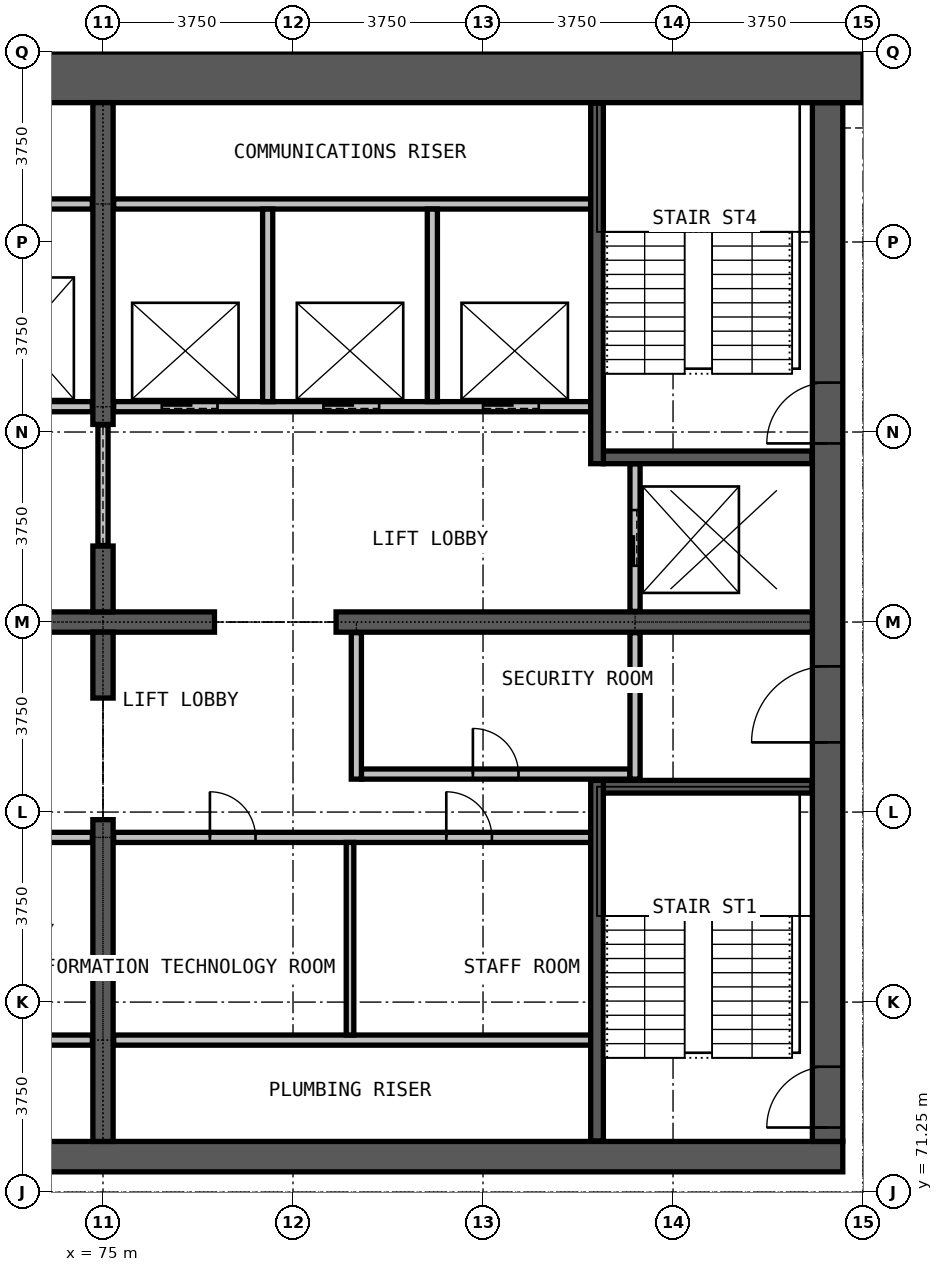
"""IFC4 building model, lengths in metres.
Left out: names, types, materials, properties, quantities, classifications, styles, units other than length and angle.
Written with IfcOpenShell. Run it as: python <this file> out.ifc"""

import sys

from ifc_helpers import new_model, si_unit, direction, frame, frame_2d, origin, place, context, subcontext, project, spatial, rectangle, extrude, element, fill, save


model = new_model("IFC4")
c1 = context("Model", 3, precision=1e-05, world=origin(), true_north=direction((0.0, 1.0)))
c2 = subcontext(c1, "Body", "Model", "MODEL_VIEW")
j1 = project(units=[si_unit("LENGTHUNIT", "METRE"), si_unit("PLANEANGLEUNIT", "RADIAN")], contexts=[c1])
p1 = place(None, origin())
s1 = spatial("IfcSite", under=j1, at=p1, CompositionType="ELEMENT")
p2 = place(p1, origin())
s2 = spatial("IfcBuilding", under=s1, at=p2, CompositionType="ELEMENT")
p3 = place(p2, frame((0.0, 0.0, 199.5)))
s3 = spatial("IfcBuildingStorey", under=s2, at=p3, CompositionType="ELEMENT", Elevation=199.5)
p4 = place(p3, frame((60.4, 71.95, 0.0), z_axis=(0.0, 0.0, 1.0), x_axis=(1.0, 0.0, 0.0)))
e1 = element("IfcWall", 1, at=p4, inside=s3, PredefinedType="SHEAR", context=c2, shape_type="SweptSolid", body=[
    extrude(rectangle(XDim=29.2, YDim=0.6, at=frame_2d((14.6, 0.0))), origin(), (0.0, 0.0, 1.0), 3.6),
])
p5 = place(p3, frame((89.3, 72.25, 0.0), z_axis=(0.0, 0.0, 1.0), x_axis=(0.0, 1.0, 0.0)))
e2 = element("IfcWall", 2, at=p5, inside=s3, PredefinedType="SHEAR", context=c2, shape_type="SweptSolid", body=[
    extrude(rectangle(XDim=20.5, YDim=0.6, at=frame_2d((10.25, 0.0))), origin(), (0.0, 0.0, 1.0), 3.6),
])
p6 = place(p5, frame((0.275, 0.0, 0.0)))
e3 = element("IfcOpeningElement", 3, at=p6, cuts=e2, PredefinedType="OPENING", context=c2, shape_type="SweptSolid", body=[
    extrude(rectangle(XDim=1.2, YDim=2.2, at=frame_2d((0.6, 1.1))), frame((0.0, 0.31, 0.0), z_axis=(0.0, -1.0, 0.0), x_axis=(1.0, 0.0, 0.0)), (0.0, 0.0, 1.0), 0.62),
])
p7 = place(p5, frame((13.775, 0.0, 0.0)))
e4 = element("IfcOpeningElement", 4, at=p7, cuts=e2, PredefinedType="OPENING", context=c2, shape_type="SweptSolid", body=[
    extrude(rectangle(XDim=1.2, YDim=2.2, at=frame_2d((0.6, 1.1))), frame((0.0, 0.31, 0.0), z_axis=(0.0, -1.0, 0.0), x_axis=(1.0, 0.0, 0.0)), (0.0, 0.0, 1.0), 0.62),
])
p8 = place(p5, frame((7.875, 0.0, 0.0)))
e5 = element("IfcOpeningElement", 5, at=p8, cuts=e2, PredefinedType="OPENING", context=c2, shape_type="SweptSolid", body=[
    extrude(rectangle(XDim=1.5, YDim=2.2, at=frame_2d((0.75, 1.1))), frame((0.0, 0.31, 0.0), z_axis=(0.0, -1.0, 0.0), x_axis=(1.0, 0.0, 0.0)), (0.0, 0.0, 1.0), 0.62),
])
p9 = place(p3, frame((90.0, 93.25, 0.0), z_axis=(0.0, 0.0, 1.0), x_axis=(-1.0, 0.0, 0.0)))
e6 = element("IfcWall", 6, at=p9, inside=s3, PredefinedType="SHEAR", context=c2, shape_type="SweptSolid", body=[
    extrude(rectangle(XDim=30.0, YDim=1.0, at=frame_2d((15.0, 0.0))), origin(), (0.0, 0.0, 1.0), 3.6),
])
p10 = place(p3, frame((72.8, 82.5, 0.0), z_axis=(0.0, 0.0, 1.0), x_axis=(1.0, 0.0, 0.0)))
e7 = element("IfcWall", 7, at=p10, inside=s3, PredefinedType="SHEAR", context=c2, shape_type="SweptSolid", body=[
    extrude(rectangle(XDim=4.4, YDim=0.4, at=frame_2d((2.2, 0.0))), origin(), (0.0, 0.0, 1.0), 3.6),
])
p11 = place(p3, frame((79.6, 82.5, 0.0), z_axis=(0.0, 0.0, 1.0), x_axis=(1.0, 0.0, 0.0)))
e8 = element("IfcWall", 8, at=p11, inside=s3, PredefinedType="SHEAR", context=c2, shape_type="SweptSolid", body=[
    extrude(rectangle(XDim=9.4, YDim=0.4, at=frame_2d((4.7, 0.0))), origin(), (0.0, 0.0, 1.0), 3.6),
])
p12 = place(p3, frame((75.0, 72.25, 0.0), z_axis=(0.0, 0.0, 1.0), x_axis=(0.0, 1.0, 0.0)))
e9 = element("IfcWall", 9, at=p12, inside=s3, PredefinedType="SHEAR", context=c2, shape_type="SweptSolid", body=[
    extrude(rectangle(XDim=6.35, YDim=0.4, at=frame_2d((3.175, 0.0))), origin(), (0.0, 0.0, 1.0), 3.6),
])
for number, where, z_axis, x_axis in (
    (10, (75.0, 81.0, 0.0), (0.0, 0.0, 1.0), (0.0, 1.0, 0.0)),
    (11, (75.0, 82.7, 0.0), (0.0, 0.0, 1.0), (0.0, 1.0, 0.0)),
):
    element("IfcWall", number, at=place(p3, frame(where, z_axis=z_axis, x_axis=x_axis)), inside=s3, PredefinedType="SHEAR", context=c2, shape_type="SweptSolid", body=[
        extrude(rectangle(XDim=1.3, YDim=0.4, at=frame_2d((0.65, 0.0))), origin(), (0.0, 0.0, 1.0), 3.6),
    ])
p13 = place(p3, frame((75.0, 86.4, 0.0), z_axis=(0.0, 0.0, 1.0), x_axis=(0.0, 1.0, 0.0)))
e12 = element("IfcWall", 12, at=p13, inside=s3, PredefinedType="SHEAR", context=c2, shape_type="SweptSolid", body=[
    extrude(rectangle(XDim=6.35, YDim=0.4, at=frame_2d((3.175, 0.0))), origin(), (0.0, 0.0, 1.0), 3.6),
])
for number, where, z_axis, x_axis in (
    (13, (65.375, 74.25, 0.0), (0.0, 0.0, 1.0), (1.0, 0.0, 0.0)),
    (14, (75.21, 74.25, 0.0), (0.0, 0.0, 1.0), (1.0, 0.0, 0.0)),
):
    element("IfcWall", number, at=place(p3, frame(where, z_axis=z_axis, x_axis=x_axis)), inside=s3, PredefinedType="PARTITIONING", context=c2, shape_type="SweptSolid", body=[
        extrude(rectangle(XDim=9.415, YDim=0.2, at=frame_2d((4.708, 0.0))), origin(), (0.0, 0.0, 1.0), 3.3),
    ])
p14 = place(p3, frame((65.375, 78.25, 0.0), z_axis=(0.0, 0.0, 1.0), x_axis=(1.0, 0.0, 0.0)))
e15 = element("IfcWall", 15, at=p14, inside=s3, PredefinedType="PARTITIONING", context=c2, shape_type="SweptSolid", body=[
    extrude(rectangle(XDim=9.415, YDim=0.2, at=frame_2d((4.708, 0.0))), origin(), (0.0, 0.0, 1.0), 3.3),
])
p15 = place(p14, frame((1.0, 0.0, 0.0)))
e16 = element("IfcOpeningElement", 16, at=p15, cuts=e15, PredefinedType="OPENING", context=c2, shape_type="SweptSolid", body=[
    extrude(rectangle(XDim=0.9, YDim=2.2, at=frame_2d((0.45, 1.1))), frame((0.0, 0.11, 0.0), z_axis=(0.0, -1.0, 0.0), x_axis=(1.0, 0.0, 0.0)), (0.0, 0.0, 1.0), 0.22),
])
p16 = place(p14, frame((5.665, 0.0, 0.0)))
e17 = element("IfcOpeningElement", 17, at=p16, cuts=e15, PredefinedType="OPENING", context=c2, shape_type="SweptSolid", body=[
    extrude(rectangle(XDim=0.9, YDim=2.2, at=frame_2d((0.45, 1.1))), frame((0.0, 0.11, 0.0), z_axis=(0.0, -1.0, 0.0), x_axis=(1.0, 0.0, 0.0)), (0.0, 0.0, 1.0), 0.22),
])
p17 = place(p3, frame((75.21, 78.25, 0.0), z_axis=(0.0, 0.0, 1.0), x_axis=(1.0, 0.0, 0.0)))
e18 = element("IfcWall", 18, at=p17, inside=s3, PredefinedType="PARTITIONING", context=c2, shape_type="SweptSolid", body=[
    extrude(rectangle(XDim=9.415, YDim=0.2, at=frame_2d((4.708, 0.0))), origin(), (0.0, 0.0, 1.0), 3.3),
])
p18 = place(p17, frame((1.9, 0.0, 0.0)))
e19 = element("IfcOpeningElement", 19, at=p18, cuts=e18, PredefinedType="OPENING", context=c2, shape_type="SweptSolid", body=[
    extrude(rectangle(XDim=0.9, YDim=2.2, at=frame_2d((0.45, 1.1))), frame((0.0, 0.11, 0.0), z_axis=(0.0, -1.0, 0.0), x_axis=(1.0, 0.0, 0.0)), (0.0, 0.0, 1.0), 0.22),
])
p19 = place(p17, frame((6.565, 0.0, 0.0)))
e20 = element("IfcOpeningElement", 20, at=p19, cuts=e18, PredefinedType="OPENING", context=c2, shape_type="SweptSolid", body=[
    extrude(rectangle(XDim=0.9, YDim=2.2, at=frame_2d((0.45, 1.1))), frame((0.0, 0.11, 0.0), z_axis=(0.0, -1.0, 0.0), x_axis=(1.0, 0.0, 0.0)), (0.0, 0.0, 1.0), 0.22),
])
p20 = place(p3, frame((80.1, 79.5, 0.0), z_axis=(0.0, 0.0, 1.0), x_axis=(1.0, 0.0, 0.0)))
e21 = element("IfcWall", 21, at=p20, inside=s3, PredefinedType="PARTITIONING", context=c2, shape_type="SweptSolid", body=[
    extrude(rectangle(XDim=5.3, YDim=0.2, at=frame_2d((2.65, 0.0))), origin(), (0.0, 0.0, 1.0), 3.3),
])
p21 = place(p20, frame((2.2, 0.0, 0.0)))
e22 = element("IfcOpeningElement", 22, at=p21, cuts=e21, PredefinedType="OPENING", context=c2, shape_type="SweptSolid", body=[
    extrude(rectangle(XDim=0.9, YDim=2.2, at=frame_2d((0.45, 1.1))), frame((0.0, 0.11, 0.0), z_axis=(0.0, -1.0, 0.0), x_axis=(1.0, 0.0, 0.0)), (0.0, 0.0, 1.0), 0.22),
])
p22 = place(p3, frame((75.0, 84.01, 0.0), z_axis=(0.0, 0.0, 1.0), x_axis=(0.0, 1.0, 0.0)))
e23 = element("IfcWall", 23, at=p22, inside=s3, PredefinedType="PARTITIONING", context=c2, shape_type="SweptSolid", body=[
    extrude(rectangle(XDim=2.38, YDim=0.2, at=frame_2d((1.19, 0.0))), origin(), (0.0, 0.0, 1.0), 2.4),
])
for number, where, z_axis, x_axis in (
    (24, (80.0, 79.4, 0.0), (0.0, 0.0, 1.0), (0.0, 1.0, 0.0)),
    (25, (85.5, 79.4, 0.0), (0.0, 0.0, 1.0), (0.0, 1.0, 0.0)),
):
    element("IfcWall", number, at=place(p3, frame(where, z_axis=z_axis, x_axis=x_axis)), inside=s3, PredefinedType="PARTITIONING", context=c2, shape_type="SweptSolid", body=[
        extrude(rectangle(XDim=2.89, YDim=0.2, at=frame_2d((1.445, 0.0))), origin(), (0.0, 0.0, 1.0), 3.3),
    ])
p23 = place(p3, frame((79.875, 74.35, 0.0), z_axis=(0.0, 0.0, 1.0), x_axis=(0.0, 1.0, 0.0)))
e26 = element("IfcWall", 26, at=p23, inside=s3, PredefinedType="PARTITIONING", context=c2, shape_type="SweptSolid", body=[
    extrude(rectangle(XDim=3.8, YDim=0.15, at=frame_2d((1.9, 0.0))), origin(), (0.0, 0.0, 1.0), 3.3),
])
p24 = place(p3, frame((65.375, 86.75, 0.0), z_axis=(0.0, 0.0, 1.0), x_axis=(1.0, 0.0, 0.0)))
e27 = element("IfcWall", 27, at=p24, inside=s3, PredefinedType="PARTITIONING", context=c2, shape_type="SweptSolid", body=[
    extrude(rectangle(XDim=9.415, YDim=0.2, at=frame_2d((4.708, 0.0))), origin(), (0.0, 0.0, 1.0), 3.3),
])
p25 = place(p24, frame((1.0, 0.0, 0.0)))
e28 = element("IfcOpeningElement", 28, at=p25, cuts=e27, PredefinedType="OPENING", context=c2, shape_type="SweptSolid", body=[
    extrude(rectangle(XDim=1.1, YDim=2.2, at=frame_2d((0.55, 1.1))), frame((0.0, 0.11, 0.0), z_axis=(0.0, -1.0, 0.0), x_axis=(1.0, 0.0, 0.0)), (0.0, 0.0, 1.0), 0.22),
])
p26 = place(p24, frame((4.175, 0.0, 0.0)))
e29 = element("IfcOpeningElement", 29, at=p26, cuts=e27, PredefinedType="OPENING", context=c2, shape_type="SweptSolid", body=[
    extrude(rectangle(XDim=1.1, YDim=2.2, at=frame_2d((0.55, 1.1))), frame((0.0, 0.11, 0.0), z_axis=(0.0, -1.0, 0.0), x_axis=(1.0, 0.0, 0.0)), (0.0, 0.0, 1.0), 0.22),
])
p27 = place(p24, frame((7.325, 0.0, 0.0)))
e30 = element("IfcOpeningElement", 30, at=p27, cuts=e27, PredefinedType="OPENING", context=c2, shape_type="SweptSolid", body=[
    extrude(rectangle(XDim=1.1, YDim=2.2, at=frame_2d((0.55, 1.1))), frame((0.0, 0.11, 0.0), z_axis=(0.0, -1.0, 0.0), x_axis=(1.0, 0.0, 0.0)), (0.0, 0.0, 1.0), 0.22),
])
p28 = place(p3, frame((75.21, 86.75, 0.0), z_axis=(0.0, 0.0, 1.0), x_axis=(1.0, 0.0, 0.0)))
e31 = element("IfcWall", 31, at=p28, inside=s3, PredefinedType="PARTITIONING", context=c2, shape_type="SweptSolid", body=[
    extrude(rectangle(XDim=9.415, YDim=0.2, at=frame_2d((4.708, 0.0))), origin(), (0.0, 0.0, 1.0), 3.3),
])
p29 = place(p28, frame((0.95, 0.0, 0.0)))
e32 = element("IfcOpeningElement", 32, at=p29, cuts=e31, PredefinedType="OPENING", context=c2, shape_type="SweptSolid", body=[
    extrude(rectangle(XDim=1.1, YDim=2.2, at=frame_2d((0.55, 1.1))), frame((0.0, 0.11, 0.0), z_axis=(0.0, -1.0, 0.0), x_axis=(1.0, 0.0, 0.0)), (0.0, 0.0, 1.0), 0.22),
])
p30 = place(p28, frame((4.14, 0.0, 0.0)))
e33 = element("IfcOpeningElement", 33, at=p30, cuts=e31, PredefinedType="OPENING", context=c2, shape_type="SweptSolid", body=[
    extrude(rectangle(XDim=1.1, YDim=2.2, at=frame_2d((0.55, 1.1))), frame((0.0, 0.11, 0.0), z_axis=(0.0, -1.0, 0.0), x_axis=(1.0, 0.0, 0.0)), (0.0, 0.0, 1.0), 0.22),
])
p31 = place(p28, frame((7.29, 0.0, 0.0)))
e34 = element("IfcOpeningElement", 34, at=p31, cuts=e31, PredefinedType="OPENING", context=c2, shape_type="SweptSolid", body=[
    extrude(rectangle(XDim=1.1, YDim=2.2, at=frame_2d((0.55, 1.1))), frame((0.0, 0.11, 0.0), z_axis=(0.0, -1.0, 0.0), x_axis=(1.0, 0.0, 0.0)), (0.0, 0.0, 1.0), 0.22),
])
for number, where, z_axis, x_axis in (
    (35, (65.375, 90.75, 0.0), (0.0, 0.0, 1.0), (1.0, 0.0, 0.0)),
    (36, (75.21, 90.75, 0.0), (0.0, 0.0, 1.0), (1.0, 0.0, 0.0)),
):
    element("IfcWall", number, at=place(p3, frame(where, z_axis=z_axis, x_axis=x_axis)), inside=s3, PredefinedType="PARTITIONING", context=c2, shape_type="SweptSolid", body=[
        extrude(rectangle(XDim=9.415, YDim=0.2, at=frame_2d((4.708, 0.0))), origin(), (0.0, 0.0, 1.0), 3.3),
    ])
for number, where, z_axis, x_axis in (
    (37, (78.25, 86.85, 0.0), (0.0, 0.0, 1.0), (0.0, 1.0, 0.0)),
    (38, (81.5, 86.85, 0.0), (0.0, 0.0, 1.0), (0.0, 1.0, 0.0)),
):
    element("IfcWall", number, at=place(p3, frame(where, z_axis=z_axis, x_axis=x_axis)), inside=s3, PredefinedType="PARTITIONING", context=c2, shape_type="SweptSolid", body=[
        extrude(rectangle(XDim=3.8, YDim=0.2, at=frame_2d((1.9, 0.0))), origin(), (0.0, 0.0, 1.0), 3.3),
    ])
p32 = place(p3, frame((85.5, 82.71, 0.0), z_axis=(0.0, 0.0, 1.0), x_axis=(0.0, 1.0, 0.0)))
e39 = element("IfcWall", 39, at=p32, inside=s3, PredefinedType="PARTITIONING", context=c2, shape_type="SweptSolid", body=[
    extrude(rectangle(XDim=2.915, YDim=0.2, at=frame_2d((1.458, 0.0))), origin(), (0.0, 0.0, 1.0), 3.3),
])
p33 = place(p32, frame((0.9, 0.0, 0.0)))
e40 = element("IfcOpeningElement", 40, at=p33, cuts=e39, PredefinedType="OPENING", context=c2, shape_type="SweptSolid", body=[
    extrude(rectangle(XDim=1.1, YDim=2.2, at=frame_2d((0.55, 1.1))), frame((0.0, 0.11, 0.0), z_axis=(0.0, -1.0, 0.0), x_axis=(1.0, 0.0, 0.0)), (0.0, 0.0, 1.0), 0.22),
])
for number, where, z_axis, x_axis in (
    (41, (84.875, 79.25, 0.0), (0.0, 0.0, 1.0), (1.0, 0.0, 0.0)),
    (42, (84.875, 85.75, 0.0), (0.0, 0.0, 1.0), (1.0, 0.0, 0.0)),
):
    element("IfcWall", number, at=place(p3, frame(where, z_axis=z_axis, x_axis=x_axis)), inside=s3, PredefinedType="PARTITIONING", context=c2, shape_type="SweptSolid", body=[
        extrude(rectangle(XDim=4.115, YDim=0.25, at=frame_2d((2.058, 0.0))), origin(), (0.0, 0.0, 1.0), 3.3),
    ])
for number, where, z_axis, x_axis in (
    (43, (84.75, 72.26, 0.0), (0.0, 0.0, 1.0), (0.0, 1.0, 0.0)),
    (44, (84.75, 85.625, 0.0), (0.0, 0.0, 1.0), (0.0, 1.0, 0.0)),
):
    element("IfcWall", number, at=place(p3, frame(where, z_axis=z_axis, x_axis=x_axis)), inside=s3, PredefinedType="PARTITIONING", context=c2, shape_type="SweptSolid", body=[
        extrude(rectangle(XDim=7.115, YDim=0.25, at=frame_2d((3.558, 0.0))), origin(), (0.0, 0.0, 1.0), 3.3),
    ])
p34 = place(p29, origin())
e45 = element("IfcDoor", 45, at=p34, inside=s3, OperationType="DOUBLE_DOOR_SLIDING", PredefinedType="DOOR", context=c2, shape_type="SweptSolid", body=[
    extrude(rectangle(XDim=1.1, YDim=2.2, at=frame_2d((0.55, 1.1))), frame((0.0, 0.025, 0.0), z_axis=(0.0, -1.0, 0.0), x_axis=(1.0, 0.0, 0.0)), (0.0, 0.0, 1.0), 0.05),
])
fill(e32, e45)
p35 = place(p30, origin())
e46 = element("IfcDoor", 46, at=p35, inside=s3, OperationType="DOUBLE_DOOR_SLIDING", PredefinedType="DOOR", context=c2, shape_type="SweptSolid", body=[
    extrude(rectangle(XDim=1.1, YDim=2.2, at=frame_2d((0.55, 1.1))), frame((0.0, 0.025, 0.0), z_axis=(0.0, -1.0, 0.0), x_axis=(1.0, 0.0, 0.0)), (0.0, 0.0, 1.0), 0.05),
])
fill(e33, e46)
p36 = place(p31, origin())
e47 = element("IfcDoor", 47, at=p36, inside=s3, OperationType="DOUBLE_DOOR_SLIDING", PredefinedType="DOOR", context=c2, shape_type="SweptSolid", body=[
    extrude(rectangle(XDim=1.1, YDim=2.2, at=frame_2d((0.55, 1.1))), frame((0.0, 0.025, 0.0), z_axis=(0.0, -1.0, 0.0), x_axis=(1.0, 0.0, 0.0)), (0.0, 0.0, 1.0), 0.05),
])
fill(e34, e47)
p37 = place(p33, origin())
e48 = element("IfcDoor", 48, at=p37, inside=s3, OperationType="DOUBLE_DOOR_SLIDING", PredefinedType="DOOR", context=c2, shape_type="SweptSolid", body=[
    extrude(rectangle(XDim=1.1, YDim=2.2, at=frame_2d((0.55, 1.1))), frame((0.0, 0.025, 0.0), z_axis=(0.0, -1.0, 0.0), x_axis=(1.0, 0.0, 0.0)), (0.0, 0.0, 1.0), 0.05),
])
fill(e40, e48)
p38 = place(p6, origin())
e49 = element("IfcDoor", 49, at=p38, inside=s3, OperationType="SINGLE_SWING_RIGHT", PredefinedType="DOOR", context=c2, shape_type="SweptSolid", body=[
    extrude(rectangle(XDim=1.2, YDim=2.2, at=frame_2d((0.6, 1.1))), frame((0.0, 0.025, 0.0), z_axis=(0.0, -1.0, 0.0), x_axis=(1.0, 0.0, 0.0)), (0.0, 0.0, 1.0), 0.05),
])
fill(e3, e49)
p39 = place(p7, origin())
e50 = element("IfcDoor", 50, at=p39, inside=s3, OperationType="SINGLE_SWING_LEFT", PredefinedType="DOOR", context=c2, shape_type="SweptSolid", body=[
    extrude(rectangle(XDim=1.2, YDim=2.2, at=frame_2d((0.6, 1.1))), frame((0.0, 0.025, 0.0), z_axis=(0.0, -1.0, 0.0), x_axis=(1.0, 0.0, 0.0)), (0.0, 0.0, 1.0), 0.05),
])
fill(e4, e50)
p40 = place(p8, origin())
e51 = element("IfcDoor", 51, at=p40, inside=s3, OperationType="DOUBLE_DOOR_SINGLE_SWING", PredefinedType="DOOR", context=c2, shape_type="SweptSolid", body=[
    extrude(rectangle(XDim=1.5, YDim=2.2, at=frame_2d((0.75, 1.1))), frame((0.0, 0.025, 0.0), z_axis=(0.0, -1.0, 0.0), x_axis=(1.0, 0.0, 0.0)), (0.0, 0.0, 1.0), 0.05),
])
fill(e5, e51)
p41 = place(p21, origin())
e52 = element("IfcDoor", 52, at=p41, inside=s3, OperationType="SINGLE_SWING_LEFT", PredefinedType="DOOR", context=c2, shape_type="SweptSolid", body=[
    extrude(rectangle(XDim=0.9, YDim=2.2, at=frame_2d((0.45, 1.1))), frame((0.0, 0.025, 0.0), z_axis=(0.0, -1.0, 0.0), x_axis=(1.0, 0.0, 0.0)), (0.0, 0.0, 1.0), 0.05),
])
fill(e22, e52)
p42 = place(p18, origin())
e53 = element("IfcDoor", 53, at=p42, inside=s3, OperationType="SINGLE_SWING_RIGHT", PredefinedType="DOOR", context=c2, shape_type="SweptSolid", body=[
    extrude(rectangle(XDim=0.9, YDim=2.2, at=frame_2d((0.45, 1.1))), frame((0.0, 0.025, 0.0), z_axis=(0.0, -1.0, 0.0), x_axis=(1.0, 0.0, 0.0)), (0.0, 0.0, 1.0), 0.05),
])
fill(e19, e53)
p43 = place(p19, origin())
e54 = element("IfcDoor", 54, at=p43, inside=s3, OperationType="SINGLE_SWING_LEFT", PredefinedType="DOOR", context=c2, shape_type="SweptSolid", body=[
    extrude(rectangle(XDim=0.9, YDim=2.2, at=frame_2d((0.45, 1.1))), frame((0.0, 0.025, 0.0), z_axis=(0.0, -1.0, 0.0), x_axis=(1.0, 0.0, 0.0)), (0.0, 0.0, 1.0), 0.05),
])
fill(e20, e54)
save(model, sys.argv[1])
